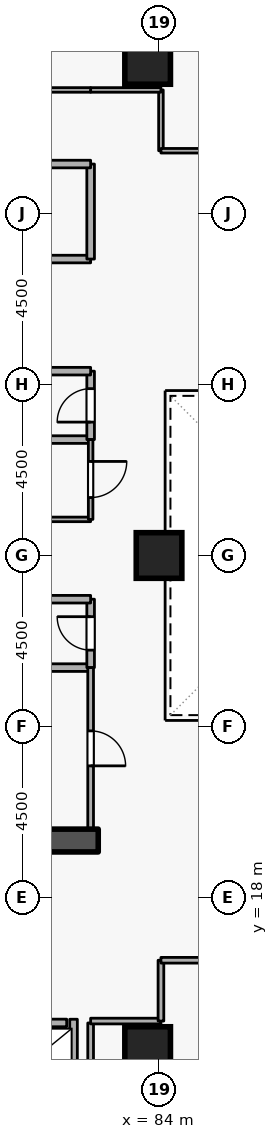
"""IFC4 building model, lengths in metres.
Left out: names, types, materials, properties, quantities, classifications, styles, units other than length and angle.
Written with IfcOpenShell. Run it as: python <this file> out.ifc"""

import sys

from ifc_helpers import new_model, si_unit, direction, frame, frame_2d, origin, origin_2d, place, context, subcontext, project, spatial, rectangle, extrude, element, fill, save


model = new_model("IFC4")
c1 = context("Model", 3, precision=1e-05, world=origin(), true_north=direction((0.0, 1.0)))
c2 = subcontext(c1, "Body", "Model", "MODEL_VIEW")
j1 = project(units=[si_unit("LENGTHUNIT", "METRE"), si_unit("PLANEANGLEUNIT", "RADIAN")], contexts=[c1])
p1 = place(None, origin())
s1 = spatial("IfcSite", under=j1, at=p1, CompositionType="ELEMENT")
p2 = place(p1, origin())
s2 = spatial("IfcBuilding", under=s1, at=p2, CompositionType="ELEMENT")
p3 = place(p2, frame((0.0, 0.0, 75.9)))
s3 = spatial("IfcBuildingStorey", under=s2, at=p3, CompositionType="ELEMENT", Elevation=75.9)
p4 = place(p3, frame((76.7, 19.5, 0.0), z_axis=(0.0, 0.0, 1.0), x_axis=(1.0, 0.0, 0.0)))
e1 = element("IfcWall", 1, at=p4, inside=s3, PredefinedType="SHEAR", context=c2, shape_type="SweptSolid", body=[
    extrude(rectangle(XDim=5.7, YDim=0.6, at=frame_2d((2.85, 0.0))), origin(), (0.0, 0.0, 1.0), 4.2),
])
for number, where, z_axis, x_axis in (
    (2, (83.7, 14.0, 0.0), (0.0, 0.0, 1.0), (1.0, 0.0, 0.0)),
    (3, (83.7, 40.0, 0.0), (0.0, 0.0, 1.0), (1.0, 0.0, 0.0)),
    (4, (84.0, 27.0, 0.0), (0.0, 0.0, 1.0), (1.0, 0.0, 0.0)),
):
    element("IfcColumn", number, at=place(p3, frame(where, z_axis=z_axis, x_axis=x_axis)), inside=s3, PredefinedType="COLUMN", context=c2, shape_type="SweptSolid", body=[
        extrude(rectangle(XDim=1.2, YDim=1.2, at=origin_2d()), origin(), (0.0, 0.0, 1.0), 4.2),
    ])
p5 = place(p3, frame((79.63, 14.7, 0.0), z_axis=(0.0, 0.0, 1.0), x_axis=(1.0, 0.0, 0.0)))
e5 = element("IfcWall", 5, at=p5, inside=s3, PredefinedType="STANDARD", context=c2, shape_type="SweptSolid", body=[
    extrude(rectangle(XDim=1.94, YDim=0.2, at=frame_2d((0.97, 0.0))), origin(), (0.0, 0.0, 1.0), 3.94),
])
p6 = place(p5, frame((0.46, 0.0, 0.0)))
e6 = element("IfcOpeningElement", 6, at=p6, cuts=e5, PredefinedType="OPENING", context=c2, shape_type="SweptSolid", body=[
    extrude(rectangle(XDim=1.02, YDim=2.06, at=frame_2d((0.51, 1.03))), frame((0.0, 0.11, 0.0), z_axis=(0.0, -1.0, 0.0), x_axis=(1.0, 0.0, 0.0)), (0.0, 0.0, 1.0), 0.22),
])
p7 = place(p3, frame((81.75, 12.612, 0.0), z_axis=(0.0, 0.0, 1.0), x_axis=(0.0, 1.0, 0.0)))
e7 = element("IfcWall", 7, at=p7, inside=s3, PredefinedType="STANDARD", context=c2, shape_type="SweptSolid", body=[
    extrude(rectangle(XDim=2.186, YDim=0.2, at=frame_2d((1.093, 0.0))), origin(), (0.0, 0.0, 1.0), 3.94),
])
p8 = place(p3, frame((79.9, 34.8, 0.0), z_axis=(0.0, 0.0, 1.0), x_axis=(1.0, 0.0, 0.0)))
e8 = element("IfcWall", 8, at=p8, inside=s3, PredefinedType="STANDARD", context=c2, shape_type="SweptSolid", body=[
    extrude(rectangle(XDim=2.3, YDim=0.2, at=frame_2d((1.15, 0.0))), origin(), (0.0, 0.0, 1.0), 3.145),
])
p9 = place(p3, frame((82.2, 34.8, 0.0), z_axis=(0.0, 0.0, 1.0), x_axis=(0.0, 1.0, 0.0)))
e9 = element("IfcWall", 9, at=p9, inside=s3, PredefinedType="STANDARD", context=c2, shape_type="SweptSolid", body=[
    extrude(rectangle(XDim=2.5, YDim=0.2, at=frame_2d((1.25, 0.0))), origin(), (0.0, 0.0, 1.0), 3.94),
])
p10 = place(p3, frame((82.2, 37.3, 0.0), z_axis=(0.0, 0.0, 1.0), x_axis=(-1.0, 0.0, 0.0)))
e10 = element("IfcWall", 10, at=p10, inside=s3, PredefinedType="STANDARD", context=c2, shape_type="SweptSolid", body=[
    extrude(rectangle(XDim=5.7, YDim=0.2, at=frame_2d((2.85, 0.0))), origin(), (0.0, 0.0, 1.0), 3.94),
])
p11 = place(p10, frame((2.275, 0.0, 0.0)))
e11 = element("IfcOpeningElement", 11, at=p11, cuts=e10, PredefinedType="OPENING", context=c2, shape_type="SweptSolid", body=[
    extrude(rectangle(XDim=1.15, YDim=2.1, at=frame_2d((0.575, 1.05))), frame((0.0, 0.11, 0.0), z_axis=(0.0, -1.0, 0.0), x_axis=(1.0, 0.0, 0.0)), (0.0, 0.0, 1.0), 0.22),
])
p12 = place(p3, frame((80.15, 24.05, 0.0), z_axis=(0.0, 0.0, 1.0), x_axis=(1.0, 0.0, 0.0)))
e12 = element("IfcWall", 12, at=p12, inside=s3, PredefinedType="STANDARD", context=c2, shape_type="SweptSolid", body=[
    extrude(rectangle(XDim=2.05, YDim=0.2, at=frame_2d((1.025, 0.0))), origin(), (0.0, 0.0, 1.0), 3.94),
])
p13 = place(p3, frame((82.2, 24.05, 0.0), z_axis=(0.0, 0.0, 1.0), x_axis=(0.0, 1.0, 0.0)))
e13 = element("IfcWall", 13, at=p13, inside=s3, PredefinedType="STANDARD", context=c2, shape_type="SweptSolid", body=[
    extrude(rectangle(XDim=1.8, YDim=0.2, at=frame_2d((0.9, 0.0))), origin(), (0.0, 0.0, 1.0), 3.94),
])
p14 = place(p13, frame((0.46, 0.0, 0.0)))
e14 = element("IfcOpeningElement", 14, at=p14, cuts=e13, PredefinedType="OPENING", context=c2, shape_type="SweptSolid", body=[
    extrude(rectangle(XDim=0.88, YDim=2.04, at=frame_2d((0.44, 1.02))), frame((0.0, 0.11, 0.0), z_axis=(0.0, -1.0, 0.0), x_axis=(1.0, 0.0, 0.0)), (0.0, 0.0, 1.0), 0.22),
])
for number, where, z_axis, x_axis in (
    (15, (82.2, 25.85, 0.0), (0.0, 0.0, 1.0), (-1.0, 0.0, 0.0)),
    (16, (80.15, 30.05, 0.0), (0.0, 0.0, 1.0), (1.0, 0.0, 0.0)),
):
    element("IfcWall", number, at=place(p3, frame(where, z_axis=z_axis, x_axis=x_axis)), inside=s3, PredefinedType="STANDARD", context=c2, shape_type="SweptSolid", body=[
        extrude(rectangle(XDim=2.05, YDim=0.2, at=frame_2d((1.025, 0.0))), origin(), (0.0, 0.0, 1.0), 3.94),
    ])
p15 = place(p3, frame((82.2, 30.05, 0.0), z_axis=(0.0, 0.0, 1.0), x_axis=(0.0, 1.0, 0.0)))
e17 = element("IfcWall", 17, at=p15, inside=s3, PredefinedType="STANDARD", context=c2, shape_type="SweptSolid", body=[
    extrude(rectangle(XDim=1.8, YDim=0.2, at=frame_2d((0.9, 0.0))), origin(), (0.0, 0.0, 1.0), 3.94),
])
p16 = place(p15, frame((0.46, 0.0, 0.0)))
e18 = element("IfcOpeningElement", 18, at=p16, cuts=e17, PredefinedType="OPENING", context=c2, shape_type="SweptSolid", body=[
    extrude(rectangle(XDim=0.88, YDim=2.04, at=frame_2d((0.44, 1.02))), frame((0.0, 0.11, 0.0), z_axis=(0.0, -1.0, 0.0), x_axis=(1.0, 0.0, 0.0)), (0.0, 0.0, 1.0), 0.22),
])
p17 = place(p3, frame((82.2, 31.85, 0.0), z_axis=(0.0, 0.0, 1.0), x_axis=(-1.0, 0.0, 0.0)))
e19 = element("IfcWall", 19, at=p17, inside=s3, PredefinedType="STANDARD", context=c2, shape_type="SweptSolid", body=[
    extrude(rectangle(XDim=2.05, YDim=0.2, at=frame_2d((1.025, 0.0))), origin(), (0.0, 0.0, 1.0), 3.94),
])
p18 = place(p3, frame((82.2, 24.05, 0.0), z_axis=(0.0, 0.0, 1.0), x_axis=(0.0, -1.0, 0.0)))
e20 = element("IfcWall", 20, at=p18, inside=s3, PredefinedType="PARTITIONING", context=c2, shape_type="SweptSolid", body=[
    extrude(rectangle(XDim=4.25, YDim=0.15, at=frame_2d((2.125, 0.0))), origin(), (0.0, 0.0, 1.0), 3.94),
])
p19 = place(p18, frame((1.665, 0.0, 0.0)))
e21 = element("IfcOpeningElement", 21, at=p19, cuts=e20, PredefinedType="OPENING", context=c2, shape_type="SweptSolid", body=[
    extrude(rectangle(XDim=0.92, YDim=2.08, at=frame_2d((0.46, 1.04))), frame((0.0, 0.085, 0.0), z_axis=(0.0, -1.0, 0.0), x_axis=(1.0, 0.0, 0.0)), (0.0, 0.0, 1.0), 0.17),
])
p20 = place(p3, frame((82.2, 27.95, 0.0), z_axis=(0.0, 0.0, 1.0), x_axis=(-1.0, 0.0, 0.0)))
e22 = element("IfcWall", 22, at=p20, inside=s3, PredefinedType="PARTITIONING", context=c2, shape_type="SweptSolid", body=[
    extrude(rectangle(XDim=2.05, YDim=0.12, at=frame_2d((1.025, 0.0))), origin(), (0.0, 0.0, 1.0), 3.94),
])
p21 = place(p3, frame((82.2, 30.05, 0.0), z_axis=(0.0, 0.0, 1.0), x_axis=(0.0, -1.0, 0.0)))
e23 = element("IfcWall", 23, at=p21, inside=s3, PredefinedType="PARTITIONING", context=c2, shape_type="SweptSolid", body=[
    extrude(rectangle(XDim=2.1, YDim=0.12, at=frame_2d((1.05, 0.0))), origin(), (0.0, 0.0, 1.0), 3.94),
])
p22 = place(p21, frame((0.575, 0.0, 0.0)))
e24 = element("IfcOpeningElement", 24, at=p22, cuts=e23, PredefinedType="OPENING", context=c2, shape_type="SweptSolid", body=[
    extrude(rectangle(XDim=0.95, YDim=2.1, at=frame_2d((0.475, 1.05))), frame((0.0, 0.07, 0.0), z_axis=(0.0, -1.0, 0.0), x_axis=(1.0, 0.0, 0.0)), (0.0, 0.0, 1.0), 0.14),
])
p23 = place(p3, frame((82.2, 12.4, 0.0), z_axis=(0.0, 0.0, 1.0), x_axis=(0.0, 1.0, 0.0)))
e25 = element("IfcWall", 25, at=p23, inside=s3, PredefinedType="PARTITIONING", context=c2, shape_type="SweptSolid", body=[
    extrude(rectangle(XDim=2.3, YDim=0.15, at=frame_2d((1.15, 0.0))), origin(), (0.0, 0.0, 1.0), 3.94),
])
p24 = place(p3, frame((82.2, 14.75, 0.0), z_axis=(0.0, 0.0, 1.0), x_axis=(1.0, 0.0, 0.0)))
e26 = element("IfcWall", 26, at=p24, inside=s3, PredefinedType="PARTITIONING", context=c2, shape_type="SweptSolid", body=[
    extrude(rectangle(XDim=1.85, YDim=0.15, at=frame_2d((0.925, 0.0))), origin(), (0.0, 0.0, 1.0), 3.94),
])
p25 = place(p3, frame((84.05, 14.75, 0.0), z_axis=(0.0, 0.0, 1.0), x_axis=(0.0, 1.0, 0.0)))
e27 = element("IfcWall", 27, at=p25, inside=s3, PredefinedType="PARTITIONING", context=c2, shape_type="SweptSolid", body=[
    extrude(rectangle(XDim=1.6, YDim=0.15, at=frame_2d((0.8, 0.0))), origin(), (0.0, 0.0, 1.0), 3.94),
])
p26 = place(p3, frame((84.05, 16.35, 0.0), z_axis=(0.0, 0.0, 1.0), x_axis=(1.0, 0.0, 0.0)))
e28 = element("IfcWall", 28, at=p26, inside=s3, PredefinedType="PARTITIONING", context=c2, shape_type="SweptSolid", body=[
    extrude(rectangle(XDim=4.45, YDim=0.15, at=frame_2d((2.225, 0.0))), origin(), (0.0, 0.0, 1.0), 3.94),
])
p27 = place(p26, frame((1.575, 0.0, 0.0)))
e29 = element("IfcOpeningElement", 29, at=p27, cuts=e28, PredefinedType="OPENING", context=c2, shape_type="SweptSolid", body=[
    extrude(rectangle(XDim=1.3, YDim=2.12, at=frame_2d((0.65, 1.06))), frame((0.0, 0.085, 0.0), z_axis=(0.0, -1.0, 0.0), x_axis=(1.0, 0.0, 0.0)), (0.0, 0.0, 1.0), 0.17),
])
p28 = place(p3, frame((84.05, 37.65, 0.0), z_axis=(0.0, 0.0, 1.0), x_axis=(0.0, 1.0, 0.0)))
e30 = element("IfcWall", 30, at=p28, inside=s3, PredefinedType="PARTITIONING", context=c2, shape_type="SweptSolid", body=[
    extrude(rectangle(XDim=1.6, YDim=0.12, at=frame_2d((0.8, 0.0))), origin(), (0.0, 0.0, 1.0), 3.94),
])
p29 = place(p3, frame((84.05, 39.25, 0.0), z_axis=(0.0, 0.0, 1.0), x_axis=(-1.0, 0.0, 0.0)))
e31 = element("IfcWall", 31, at=p29, inside=s3, PredefinedType="PARTITIONING", context=c2, shape_type="SweptSolid", body=[
    extrude(rectangle(XDim=1.85, YDim=0.12, at=frame_2d((0.925, 0.0))), origin(), (0.0, 0.0, 1.0), 3.94),
])
p30 = place(p3, frame((82.2, 39.25, 0.0), z_axis=(0.0, 0.0, 1.0), x_axis=(-1.0, 0.0, 0.0)))
e32 = element("IfcWall", 32, at=p30, inside=s3, PredefinedType="PARTITIONING", context=c2, shape_type="SweptSolid", body=[
    extrude(rectangle(XDim=9.35, YDim=0.12, at=frame_2d((4.675, 0.0))), origin(), (0.0, 0.0, 1.0), 3.94),
])
p31 = place(p30, frame((4.15, 0.0, 0.0)))
e33 = element("IfcOpeningElement", 33, at=p31, cuts=e32, PredefinedType="OPENING", context=c2, shape_type="SweptSolid", body=[
    extrude(rectangle(XDim=1.05, YDim=2.1, at=frame_2d((0.525, 1.05))), frame((0.0, 0.07, 0.0), z_axis=(0.0, -1.0, 0.0), x_axis=(1.0, 0.0, 0.0)), (0.0, 0.0, 1.0), 0.14),
])
p32 = place(p3, frame((88.5, 37.65, 0.0), z_axis=(0.0, 0.0, 1.0), x_axis=(-1.0, 0.0, 0.0)))
e34 = element("IfcWall", 34, at=p32, inside=s3, PredefinedType="PARTITIONING", context=c2, shape_type="SweptSolid", body=[
    extrude(rectangle(XDim=4.45, YDim=0.12, at=frame_2d((2.225, 0.0))), origin(), (0.0, 0.0, 1.0), 3.94),
])
p33 = place(p14, origin())
e35 = element("IfcDoor", 35, at=p33, inside=s3, OperationType="SINGLE_SWING_RIGHT", PredefinedType="DOOR", context=c2, shape_type="SweptSolid", body=[
    extrude(rectangle(XDim=0.88, YDim=2.04, at=frame_2d((0.44, 1.02))), frame((0.0, 0.025, 0.0), z_axis=(0.0, -1.0, 0.0), x_axis=(1.0, 0.0, 0.0)), (0.0, 0.0, 1.0), 0.05),
])
fill(e14, e35)
p34 = place(p16, origin())
e36 = element("IfcDoor", 36, at=p34, inside=s3, OperationType="SINGLE_SWING_LEFT", PredefinedType="DOOR", context=c2, shape_type="SweptSolid", body=[
    extrude(rectangle(XDim=0.88, YDim=2.04, at=frame_2d((0.44, 1.02))), frame((0.0, 0.025, 0.0), z_axis=(0.0, -1.0, 0.0), x_axis=(1.0, 0.0, 0.0)), (0.0, 0.0, 1.0), 0.05),
])
fill(e18, e36)
p35 = place(p19, origin())
e37 = element("IfcDoor", 37, at=p35, inside=s3, OperationType="SINGLE_SWING_RIGHT", PredefinedType="DOOR", context=c2, shape_type="SweptSolid", body=[
    extrude(rectangle(XDim=0.92, YDim=2.08, at=frame_2d((0.46, 1.04))), frame((0.0, 0.025, 0.0), z_axis=(0.0, -1.0, 0.0), x_axis=(1.0, 0.0, 0.0)), (0.0, 0.0, 1.0), 0.05),
])
fill(e21, e37)
p36 = place(p22, origin())
e38 = element("IfcDoor", 38, at=p36, inside=s3, OperationType="SINGLE_SWING_LEFT", PredefinedType="DOOR", context=c2, shape_type="SweptSolid", body=[
    extrude(rectangle(XDim=0.95, YDim=2.1, at=frame_2d((0.475, 1.05))), frame((0.0, 0.025, 0.0), z_axis=(0.0, -1.0, 0.0), x_axis=(1.0, 0.0, 0.0)), (0.0, 0.0, 1.0), 0.05),
])
fill(e24, e38)
save(model, sys.argv[1])
